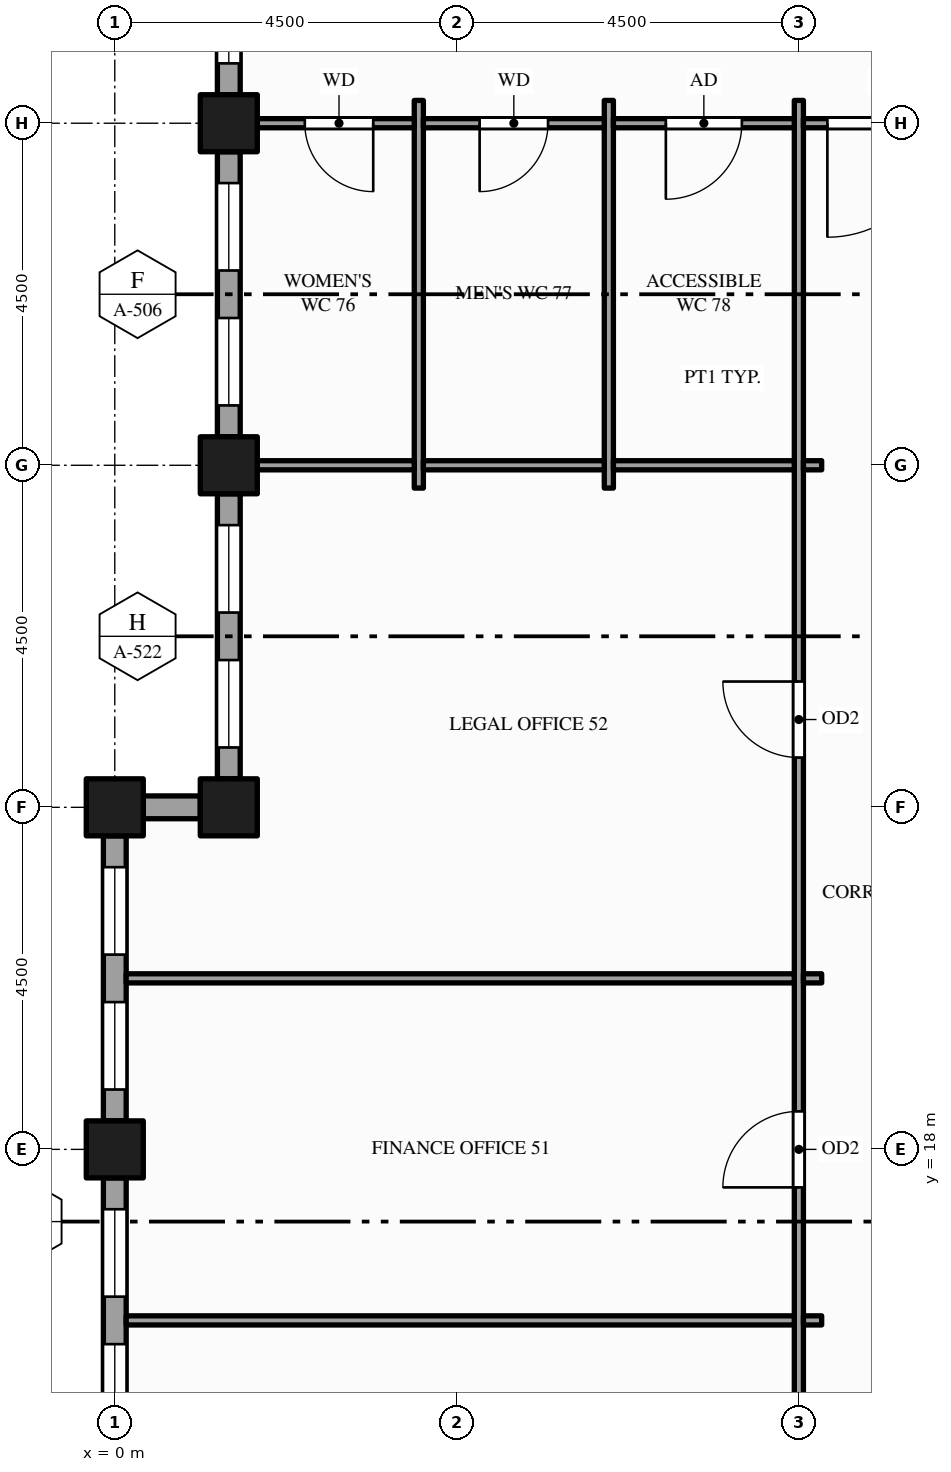
"""IFC4 building model, lengths in metres.
Left out: names, types, materials, properties, quantities, classifications, styles, units other than length and angle.
Written with IfcOpenShell. Run it as: python <this file> out.ifc"""

import sys

from ifc_helpers import new_model, si_unit, direction, frame, frame_2d, origin, origin_2d, place, context, subcontext, project, spatial, rectangle, hollow_rectangle, extrude, element, fill, save


model = new_model("IFC4")
c1 = context("Model", 3, precision=1e-05, world=origin(), true_north=direction((0.0, 1.0)))
c2 = subcontext(c1, "Body", "Model", "MODEL_VIEW")
j1 = project(units=[si_unit("LENGTHUNIT", "METRE"), si_unit("PLANEANGLEUNIT", "RADIAN")], contexts=[c1])
p1 = place(None, origin())
s1 = spatial("IfcSite", under=j1, at=p1, CompositionType="ELEMENT")
p2 = place(p1, origin())
s2 = spatial("IfcBuilding", under=s1, at=p2, CompositionType="ELEMENT")
p3 = place(p2, frame((0.0, 0.0, 199.0)))
s3 = spatial("IfcBuildingStorey", under=s2, at=p3, CompositionType="ELEMENT", Elevation=199.0)
for number, where, z_axis, x_axis in (
    (1, (0.0, 18.0, -0.15), (0.0, 0.0, 1.0), (1.0, 0.0, 0.0)),
    (2, (0.0, 22.5, -0.15), (0.0, 0.0, 1.0), (1.0, 0.0, 0.0)),
    (3, (1.5, 22.5, -0.15), (0.0, 0.0, 1.0), (1.0, 0.0, 0.0)),
    (4, (1.5, 27.0, -0.15), (0.0, 0.0, 1.0), (1.0, 0.0, 0.0)),
    (5, (1.5, 31.5, -0.15), (0.0, 0.0, 1.0), (1.0, 0.0, 0.0)),
):
    element("IfcColumn", number, at=place(p3, frame(where, z_axis=z_axis, x_axis=x_axis)), inside=s3, PredefinedType="COLUMN", context=c2, shape_type="SweptSolid", body=[
        extrude(hollow_rectangle(XDim=0.75, YDim=0.75, WallThickness=0.036, at=origin_2d()), origin(), (0.0, 0.0, 1.0), 4.0),
    ])
p4 = place(p3, frame((1.5, 36.0, 0.0), z_axis=(0.0, 0.0, 1.0), x_axis=(0.0, -1.0, 0.0)))
e6 = element("IfcWall", 6, at=p4, inside=s3, PredefinedType="STANDARD", context=c2, shape_type="SweptSolid", body=[
    extrude(rectangle(XDim=4.125, YDim=0.3, at=frame_2d((2.062, 0.0))), origin(), (0.0, 0.0, 1.0), 3.157),
])
p5 = place(p4, frame((0.4, 0.0, 0.9)))
e7 = element("IfcOpeningElement", 7, at=p5, cuts=e6, PredefinedType="OPENING", context=c2, shape_type="SweptSolid", body=[
    extrude(rectangle(XDim=1.55, YDim=2.0, at=frame_2d((0.775, 1.0))), frame((0.0, 0.16, 0.0), z_axis=(0.0, -1.0, 0.0), x_axis=(1.0, 0.0, 0.0)), (0.0, 0.0, 1.0), 0.32),
])
p6 = place(p4, frame((2.562, 0.0, 0.9)))
e8 = element("IfcOpeningElement", 8, at=p6, cuts=e6, PredefinedType="OPENING", context=c2, shape_type="SweptSolid", body=[
    extrude(rectangle(XDim=1.15, YDim=2.0, at=frame_2d((0.575, 1.0))), frame((0.0, 0.16, 0.0), z_axis=(0.0, -1.0, 0.0), x_axis=(1.0, 0.0, 0.0)), (0.0, 0.0, 1.0), 0.32),
])
p7 = place(p3, frame((1.5, 31.125, 0.0), z_axis=(0.0, 0.0, 1.0), x_axis=(0.0, -1.0, 0.0)))
e9 = element("IfcWall", 9, at=p7, inside=s3, PredefinedType="STANDARD", context=c2, shape_type="SweptSolid", body=[
    extrude(rectangle(XDim=3.75, YDim=0.3, at=frame_2d((1.875, 0.0))), origin(), (0.0, 0.0, 1.0), 3.157),
])
p8 = place(p7, frame((0.413, 0.0, 0.9)))
e10 = element("IfcOpeningElement", 10, at=p8, cuts=e9, PredefinedType="OPENING", context=c2, shape_type="SweptSolid", body=[
    extrude(rectangle(XDim=1.15, YDim=2.0, at=frame_2d((0.575, 1.0))), frame((0.0, 0.16, 0.0), z_axis=(0.0, -1.0, 0.0), x_axis=(1.0, 0.0, 0.0)), (0.0, 0.0, 1.0), 0.32),
])
p9 = place(p7, frame((2.188, 0.0, 0.9)))
e11 = element("IfcOpeningElement", 11, at=p9, cuts=e9, PredefinedType="OPENING", context=c2, shape_type="SweptSolid", body=[
    extrude(rectangle(XDim=1.15, YDim=2.0, at=frame_2d((0.575, 1.0))), frame((0.0, 0.16, 0.0), z_axis=(0.0, -1.0, 0.0), x_axis=(1.0, 0.0, 0.0)), (0.0, 0.0, 1.0), 0.32),
])
p10 = place(p3, frame((1.5, 26.625, 0.0), z_axis=(0.0, 0.0, 1.0), x_axis=(0.0, -1.0, 0.0)))
e12 = element("IfcWall", 12, at=p10, inside=s3, PredefinedType="STANDARD", context=c2, shape_type="SweptSolid", body=[
    extrude(rectangle(XDim=3.75, YDim=0.3, at=frame_2d((1.875, 0.0))), origin(), (0.0, 0.0, 1.0), 3.157),
])
p11 = place(p10, frame((0.413, 0.0, 0.9)))
e13 = element("IfcOpeningElement", 13, at=p11, cuts=e12, PredefinedType="OPENING", context=c2, shape_type="SweptSolid", body=[
    extrude(rectangle(XDim=1.15, YDim=2.0, at=frame_2d((0.575, 1.0))), frame((0.0, 0.16, 0.0), z_axis=(0.0, -1.0, 0.0), x_axis=(1.0, 0.0, 0.0)), (0.0, 0.0, 1.0), 0.32),
])
p12 = place(p10, frame((2.188, 0.0, 0.9)))
e14 = element("IfcOpeningElement", 14, at=p12, cuts=e12, PredefinedType="OPENING", context=c2, shape_type="SweptSolid", body=[
    extrude(rectangle(XDim=1.15, YDim=2.0, at=frame_2d((0.575, 1.0))), frame((0.0, 0.16, 0.0), z_axis=(0.0, -1.0, 0.0), x_axis=(1.0, 0.0, 0.0)), (0.0, 0.0, 1.0), 0.32),
])
p13 = place(p3, frame((1.125, 22.5, 0.0), z_axis=(0.0, 0.0, 1.0), x_axis=(-1.0, 0.0, 0.0)))
e15 = element("IfcWall", 15, at=p13, inside=s3, PredefinedType="STANDARD", context=c2, shape_type="SweptSolid", body=[
    extrude(rectangle(XDim=0.75, YDim=0.3, at=frame_2d((0.375, 0.0))), origin(), (0.0, 0.0, 1.0), 3.157),
])
p14 = place(p3, frame((0.0, 22.125, 0.0), z_axis=(0.0, 0.0, 1.0), x_axis=(0.0, -1.0, 0.0)))
e16 = element("IfcWall", 16, at=p14, inside=s3, PredefinedType="STANDARD", context=c2, shape_type="SweptSolid", body=[
    extrude(rectangle(XDim=3.75, YDim=0.3, at=frame_2d((1.875, 0.0))), origin(), (0.0, 0.0, 1.0), 3.157),
])
p15 = place(p14, frame((0.413, 0.0, 0.9)))
e17 = element("IfcOpeningElement", 17, at=p15, cuts=e16, PredefinedType="OPENING", context=c2, shape_type="SweptSolid", body=[
    extrude(rectangle(XDim=1.15, YDim=2.0, at=frame_2d((0.575, 1.0))), frame((0.0, 0.16, 0.0), z_axis=(0.0, -1.0, 0.0), x_axis=(1.0, 0.0, 0.0)), (0.0, 0.0, 1.0), 0.32),
])
p16 = place(p14, frame((2.188, 0.0, 0.9)))
e18 = element("IfcOpeningElement", 18, at=p16, cuts=e16, PredefinedType="OPENING", context=c2, shape_type="SweptSolid", body=[
    extrude(rectangle(XDim=1.15, YDim=2.0, at=frame_2d((0.575, 1.0))), frame((0.0, 0.16, 0.0), z_axis=(0.0, -1.0, 0.0), x_axis=(1.0, 0.0, 0.0)), (0.0, 0.0, 1.0), 0.32),
])
p17 = place(p3, frame((0.0, 17.625, 0.0), z_axis=(0.0, 0.0, 1.0), x_axis=(0.0, -1.0, 0.0)))
e19 = element("IfcWall", 19, at=p17, inside=s3, PredefinedType="STANDARD", context=c2, shape_type="SweptSolid", body=[
    extrude(rectangle(XDim=3.75, YDim=0.3, at=frame_2d((1.875, 0.0))), origin(), (0.0, 0.0, 1.0), 3.157),
])
p18 = place(p17, frame((0.413, 0.0, 0.9)))
e20 = element("IfcOpeningElement", 20, at=p18, cuts=e19, PredefinedType="OPENING", context=c2, shape_type="SweptSolid", body=[
    extrude(rectangle(XDim=1.15, YDim=2.0, at=frame_2d((0.575, 1.0))), frame((0.0, 0.16, 0.0), z_axis=(0.0, -1.0, 0.0), x_axis=(1.0, 0.0, 0.0)), (0.0, 0.0, 1.0), 0.32),
])
p19 = place(p17, frame((2.188, 0.0, 0.9)))
e21 = element("IfcOpeningElement", 21, at=p19, cuts=e19, PredefinedType="OPENING", context=c2, shape_type="SweptSolid", body=[
    extrude(rectangle(XDim=1.15, YDim=2.0, at=frame_2d((0.575, 1.0))), frame((0.0, 0.16, 0.0), z_axis=(0.0, -1.0, 0.0), x_axis=(1.0, 0.0, 0.0)), (0.0, 0.0, 1.0), 0.32),
])
for number, where, z_axis, x_axis in (
    (22, (4.0, 26.7, 0.0), (0.0, 0.0, 1.0), (0.0, 1.0, 0.0)),
    (23, (6.5, 26.7, 0.0), (0.0, 0.0, 1.0), (0.0, 1.0, 0.0)),
):
    element("IfcWall", number, at=place(p3, frame(where, z_axis=z_axis, x_axis=x_axis)), inside=s3, PredefinedType="PARTITIONING", context=c2, shape_type="SweptSolid", body=[
        extrude(rectangle(XDim=5.1, YDim=0.12, at=frame_2d((2.55, 0.0))), origin(), (0.0, 0.0, 1.0), 3.85),
    ])
p20 = place(p3, frame((9.0, 10.95, 0.0), z_axis=(0.0, 0.0, 1.0), x_axis=(0.0, 1.0, 0.0)))
e24 = element("IfcWall", 24, at=p20, inside=s3, PredefinedType="PARTITIONING", context=c2, shape_type="SweptSolid", body=[
    extrude(rectangle(XDim=20.85, YDim=0.12, at=frame_2d((10.425, 0.0))), origin(), (0.0, 0.0, 1.0), 2.6),
])
p21 = place(p20, frame((2.05, 0.0, 0.0)))
e25 = element("IfcOpeningElement", 25, at=p21, cuts=e24, PredefinedType="OPENING", context=c2, shape_type="SweptSolid", body=[
    extrude(rectangle(XDim=1.0, YDim=2.1, at=frame_2d((0.5, 1.05))), frame((0.0, 0.07, 0.0), z_axis=(0.0, -1.0, 0.0), x_axis=(1.0, 0.0, 0.0)), (0.0, 0.0, 1.0), 0.14),
])
p22 = place(p20, frame((6.55, 0.0, 0.0)))
e26 = element("IfcOpeningElement", 26, at=p22, cuts=e24, PredefinedType="OPENING", context=c2, shape_type="SweptSolid", body=[
    extrude(rectangle(XDim=1.0, YDim=2.1, at=frame_2d((0.5, 1.05))), frame((0.0, 0.07, 0.0), z_axis=(0.0, -1.0, 0.0), x_axis=(1.0, 0.0, 0.0)), (0.0, 0.0, 1.0), 0.14),
])
p23 = place(p20, frame((12.205, 0.0, 0.0)))
e27 = element("IfcOpeningElement", 27, at=p23, cuts=e24, PredefinedType="OPENING", context=c2, shape_type="SweptSolid", body=[
    extrude(rectangle(XDim=1.0, YDim=2.1, at=frame_2d((0.5, 1.05))), frame((0.0, 0.07, 0.0), z_axis=(0.0, -1.0, 0.0), x_axis=(1.0, 0.0, 0.0)), (0.0, 0.0, 1.0), 0.14),
])
p24 = place(p3, frame((0.15, 15.75, 0.0), z_axis=(0.0, 0.0, 1.0), x_axis=(1.0, 0.0, 0.0)))
e28 = element("IfcWall", 28, at=p24, inside=s3, PredefinedType="PARTITIONING", context=c2, shape_type="SweptSolid", body=[
    extrude(rectangle(XDim=8.79, YDim=0.12, at=frame_2d((4.395, 0.0))), origin(), (0.0, 0.0, 1.0), 2.87),
])
p25 = place(p3, frame((9.06, 15.75, 0.0), z_axis=(0.0, 0.0, 1.0), x_axis=(1.0, 0.0, 0.0)))
e29 = element("IfcWall", 29, at=p25, inside=s3, PredefinedType="PARTITIONING", context=c2, shape_type="SweptSolid", body=[
    extrude(rectangle(XDim=0.24, YDim=0.12, at=frame_2d((0.12, 0.0))), origin(), (0.0, 0.0, 1.0), 2.87),
])
p26 = place(p3, frame((0.15, 20.25, 0.0), z_axis=(0.0, 0.0, 1.0), x_axis=(1.0, 0.0, 0.0)))
e30 = element("IfcWall", 30, at=p26, inside=s3, PredefinedType="PARTITIONING", context=c2, shape_type="SweptSolid", body=[
    extrude(rectangle(XDim=8.79, YDim=0.12, at=frame_2d((4.395, 0.0))), origin(), (0.0, 0.0, 1.0), 2.87),
])
p27 = place(p3, frame((9.06, 20.25, 0.0), z_axis=(0.0, 0.0, 1.0), x_axis=(1.0, 0.0, 0.0)))
e31 = element("IfcWall", 31, at=p27, inside=s3, PredefinedType="PARTITIONING", context=c2, shape_type="SweptSolid", body=[
    extrude(rectangle(XDim=0.24, YDim=0.12, at=frame_2d((0.12, 0.0))), origin(), (0.0, 0.0, 1.0), 2.87),
])
p28 = place(p3, frame((1.65, 27.0, 0.0), z_axis=(0.0, 0.0, 1.0), x_axis=(1.0, 0.0, 0.0)))
e32 = element("IfcWall", 32, at=p28, inside=s3, PredefinedType="PARTITIONING", context=c2, shape_type="SweptSolid", body=[
    extrude(rectangle(XDim=2.29, YDim=0.12, at=frame_2d((1.145, 0.0))), origin(), (0.0, 0.0, 1.0), 2.87),
])
for number, where, z_axis, x_axis in (
    (33, (4.06, 27.0, 0.0), (0.0, 0.0, 1.0), (1.0, 0.0, 0.0)),
    (34, (6.56, 27.0, 0.0), (0.0, 0.0, 1.0), (1.0, 0.0, 0.0)),
):
    element("IfcWall", number, at=place(p3, frame(where, z_axis=z_axis, x_axis=x_axis)), inside=s3, PredefinedType="PARTITIONING", context=c2, shape_type="SweptSolid", body=[
        extrude(rectangle(XDim=2.38, YDim=0.12, at=frame_2d((1.19, 0.0))), origin(), (0.0, 0.0, 1.0), 2.87),
    ])
p29 = place(p3, frame((9.06, 27.0, 0.0), z_axis=(0.0, 0.0, 1.0), x_axis=(1.0, 0.0, 0.0)))
e35 = element("IfcWall", 35, at=p29, inside=s3, PredefinedType="PARTITIONING", context=c2, shape_type="SweptSolid", body=[
    extrude(rectangle(XDim=0.24, YDim=0.12, at=frame_2d((0.12, 0.0))), origin(), (0.0, 0.0, 1.0), 2.87),
])
p30 = place(p3, frame((1.65, 31.5, 0.0), z_axis=(0.0, 0.0, 1.0), x_axis=(1.0, 0.0, 0.0)))
e36 = element("IfcWall", 36, at=p30, inside=s3, PredefinedType="PARTITIONING", context=c2, shape_type="SweptSolid", body=[
    extrude(rectangle(XDim=2.29, YDim=0.12, at=frame_2d((1.145, 0.0))), origin(), (0.0, 0.0, 1.0), 2.87),
])
p31 = place(p30, frame((0.85, 0.0, 0.0)))
e37 = element("IfcOpeningElement", 37, at=p31, cuts=e36, PredefinedType="OPENING", context=c2, shape_type="SweptSolid", body=[
    extrude(rectangle(XDim=0.9, YDim=2.1, at=frame_2d((0.45, 1.05))), frame((0.0, 0.07, 0.0), z_axis=(0.0, -1.0, 0.0), x_axis=(1.0, 0.0, 0.0)), (0.0, 0.0, 1.0), 0.14),
])
p32 = place(p3, frame((4.06, 31.5, 0.0), z_axis=(0.0, 0.0, 1.0), x_axis=(1.0, 0.0, 0.0)))
e38 = element("IfcWall", 38, at=p32, inside=s3, PredefinedType="PARTITIONING", context=c2, shape_type="SweptSolid", body=[
    extrude(rectangle(XDim=2.38, YDim=0.12, at=frame_2d((1.19, 0.0))), origin(), (0.0, 0.0, 1.0), 2.87),
])
p33 = place(p32, frame((0.74, 0.0, 0.0)))
e39 = element("IfcOpeningElement", 39, at=p33, cuts=e38, PredefinedType="OPENING", context=c2, shape_type="SweptSolid", body=[
    extrude(rectangle(XDim=0.9, YDim=2.1, at=frame_2d((0.45, 1.05))), frame((0.0, 0.07, 0.0), z_axis=(0.0, -1.0, 0.0), x_axis=(1.0, 0.0, 0.0)), (0.0, 0.0, 1.0), 0.14),
])
p34 = place(p3, frame((6.56, 31.5, 0.0), z_axis=(0.0, 0.0, 1.0), x_axis=(1.0, 0.0, 0.0)))
e40 = element("IfcWall", 40, at=p34, inside=s3, PredefinedType="PARTITIONING", context=c2, shape_type="SweptSolid", body=[
    extrude(rectangle(XDim=2.38, YDim=0.12, at=frame_2d((1.19, 0.0))), origin(), (0.0, 0.0, 1.0), 2.87),
])
p35 = place(p34, frame((0.69, 0.0, 0.0)))
e41 = element("IfcOpeningElement", 41, at=p35, cuts=e40, PredefinedType="OPENING", context=c2, shape_type="SweptSolid", body=[
    extrude(rectangle(XDim=1.0, YDim=2.1, at=frame_2d((0.5, 1.05))), frame((0.0, 0.07, 0.0), z_axis=(0.0, -1.0, 0.0), x_axis=(1.0, 0.0, 0.0)), (0.0, 0.0, 1.0), 0.14),
])
p36 = place(p3, frame((9.06, 31.5, 0.0), z_axis=(0.0, 0.0, 1.0), x_axis=(1.0, 0.0, 0.0)))
e42 = element("IfcWall", 42, at=p36, inside=s3, PredefinedType="PARTITIONING", context=c2, shape_type="SweptSolid", body=[
    extrude(rectangle(XDim=2.13, YDim=0.12, at=frame_2d((1.065, 0.0))), origin(), (0.0, 0.0, 1.0), 2.87),
])
p37 = place(p36, frame((0.315, 0.0, 0.0)))
e43 = element("IfcOpeningElement", 43, at=p37, cuts=e42, PredefinedType="OPENING", context=c2, shape_type="SweptSolid", body=[
    extrude(rectangle(XDim=1.5, YDim=2.1, at=frame_2d((0.75, 1.05))), frame((0.0, 0.07, 0.0), z_axis=(0.0, -1.0, 0.0), x_axis=(1.0, 0.0, 0.0)), (0.0, 0.0, 1.0), 0.14),
])
p38 = place(p6, origin())
e44 = element("IfcWindow", 44, at=p38, inside=s3, PartitioningType="SINGLE_PANEL", PredefinedType="WINDOW", context=c2, shape_type="SweptSolid", body=[
    extrude(rectangle(XDim=1.15, YDim=2.0, at=frame_2d((0.575, 1.0))), frame((0.0, 0.03, 0.0), z_axis=(0.0, -1.0, 0.0), x_axis=(1.0, 0.0, 0.0)), (0.0, 0.0, 1.0), 0.06),
])
fill(e8, e44)
p39 = place(p8, origin())
e45 = element("IfcWindow", 45, at=p39, inside=s3, PartitioningType="SINGLE_PANEL", PredefinedType="WINDOW", context=c2, shape_type="SweptSolid", body=[
    extrude(rectangle(XDim=1.15, YDim=2.0, at=frame_2d((0.575, 1.0))), frame((0.0, 0.03, 0.0), z_axis=(0.0, -1.0, 0.0), x_axis=(1.0, 0.0, 0.0)), (0.0, 0.0, 1.0), 0.06),
])
fill(e10, e45)
p40 = place(p9, origin())
e46 = element("IfcWindow", 46, at=p40, inside=s3, PartitioningType="SINGLE_PANEL", PredefinedType="WINDOW", context=c2, shape_type="SweptSolid", body=[
    extrude(rectangle(XDim=1.15, YDim=2.0, at=frame_2d((0.575, 1.0))), frame((0.0, 0.03, 0.0), z_axis=(0.0, -1.0, 0.0), x_axis=(1.0, 0.0, 0.0)), (0.0, 0.0, 1.0), 0.06),
])
fill(e11, e46)
p41 = place(p11, origin())
e47 = element("IfcWindow", 47, at=p41, inside=s3, PartitioningType="SINGLE_PANEL", PredefinedType="WINDOW", context=c2, shape_type="SweptSolid", body=[
    extrude(rectangle(XDim=1.15, YDim=2.0, at=frame_2d((0.575, 1.0))), frame((0.0, 0.03, 0.0), z_axis=(0.0, -1.0, 0.0), x_axis=(1.0, 0.0, 0.0)), (0.0, 0.0, 1.0), 0.06),
])
fill(e13, e47)
p42 = place(p12, origin())
e48 = element("IfcWindow", 48, at=p42, inside=s3, PartitioningType="SINGLE_PANEL", PredefinedType="WINDOW", context=c2, shape_type="SweptSolid", body=[
    extrude(rectangle(XDim=1.15, YDim=2.0, at=frame_2d((0.575, 1.0))), frame((0.0, 0.03, 0.0), z_axis=(0.0, -1.0, 0.0), x_axis=(1.0, 0.0, 0.0)), (0.0, 0.0, 1.0), 0.06),
])
fill(e14, e48)
p43 = place(p15, origin())
e49 = element("IfcWindow", 49, at=p43, inside=s3, PartitioningType="SINGLE_PANEL", PredefinedType="WINDOW", context=c2, shape_type="SweptSolid", body=[
    extrude(rectangle(XDim=1.15, YDim=2.0, at=frame_2d((0.575, 1.0))), frame((0.0, 0.03, 0.0), z_axis=(0.0, -1.0, 0.0), x_axis=(1.0, 0.0, 0.0)), (0.0, 0.0, 1.0), 0.06),
])
fill(e17, e49)
p44 = place(p16, origin())
e50 = element("IfcWindow", 50, at=p44, inside=s3, PartitioningType="SINGLE_PANEL", PredefinedType="WINDOW", context=c2, shape_type="SweptSolid", body=[
    extrude(rectangle(XDim=1.15, YDim=2.0, at=frame_2d((0.575, 1.0))), frame((0.0, 0.03, 0.0), z_axis=(0.0, -1.0, 0.0), x_axis=(1.0, 0.0, 0.0)), (0.0, 0.0, 1.0), 0.06),
])
fill(e18, e50)
p45 = place(p18, origin())
e51 = element("IfcWindow", 51, at=p45, inside=s3, PartitioningType="SINGLE_PANEL", PredefinedType="WINDOW", context=c2, shape_type="SweptSolid", body=[
    extrude(rectangle(XDim=1.15, YDim=2.0, at=frame_2d((0.575, 1.0))), frame((0.0, 0.03, 0.0), z_axis=(0.0, -1.0, 0.0), x_axis=(1.0, 0.0, 0.0)), (0.0, 0.0, 1.0), 0.06),
])
fill(e20, e51)
p46 = place(p19, origin())
e52 = element("IfcWindow", 52, at=p46, inside=s3, PartitioningType="SINGLE_PANEL", PredefinedType="WINDOW", context=c2, shape_type="SweptSolid", body=[
    extrude(rectangle(XDim=1.15, YDim=2.0, at=frame_2d((0.575, 1.0))), frame((0.0, 0.03, 0.0), z_axis=(0.0, -1.0, 0.0), x_axis=(1.0, 0.0, 0.0)), (0.0, 0.0, 1.0), 0.06),
])
fill(e21, e52)
p47 = place(p37, origin())
e53 = element("IfcDoor", 53, at=p47, inside=s3, OperationType="SINGLE_SWING_LEFT", PredefinedType="DOOR", context=c2, shape_type="SweptSolid", body=[
    extrude(rectangle(XDim=1.5, YDim=2.1, at=frame_2d((0.75, 1.05))), frame((0.0, 0.025, 0.0), z_axis=(0.0, -1.0, 0.0), x_axis=(1.0, 0.0, 0.0)), (0.0, 0.0, 1.0), 0.05),
])
fill(e43, e53)
p48 = place(p22, origin())
e54 = element("IfcDoor", 54, at=p48, inside=s3, OperationType="SINGLE_SWING_LEFT", PredefinedType="DOOR", context=c2, shape_type="SweptSolid", body=[
    extrude(rectangle(XDim=1.0, YDim=2.1, at=frame_2d((0.5, 1.05))), frame((0.0, 0.025, 0.0), z_axis=(0.0, -1.0, 0.0), x_axis=(1.0, 0.0, 0.0)), (0.0, 0.0, 1.0), 0.05),
])
fill(e26, e54)
p49 = place(p23, origin())
e55 = element("IfcDoor", 55, at=p49, inside=s3, OperationType="SINGLE_SWING_RIGHT", PredefinedType="DOOR", context=c2, shape_type="SweptSolid", body=[
    extrude(rectangle(XDim=1.0, YDim=2.1, at=frame_2d((0.5, 1.05))), frame((0.0, 0.025, 0.0), z_axis=(0.0, -1.0, 0.0), x_axis=(1.0, 0.0, 0.0)), (0.0, 0.0, 1.0), 0.05),
])
fill(e27, e55)
p50 = place(p31, origin())
e56 = element("IfcDoor", 56, at=p50, inside=s3, OperationType="SINGLE_SWING_RIGHT", PredefinedType="DOOR", context=c2, shape_type="SweptSolid", body=[
    extrude(rectangle(XDim=0.9, YDim=2.1, at=frame_2d((0.45, 1.05))), frame((0.0, 0.025, 0.0), z_axis=(0.0, -1.0, 0.0), x_axis=(1.0, 0.0, 0.0)), (0.0, 0.0, 1.0), 0.05),
])
fill(e37, e56)
p51 = place(p33, origin())
e57 = element("IfcDoor", 57, at=p51, inside=s3, OperationType="SINGLE_SWING_LEFT", PredefinedType="DOOR", context=c2, shape_type="SweptSolid", body=[
    extrude(rectangle(XDim=0.9, YDim=2.1, at=frame_2d((0.45, 1.05))), frame((0.0, 0.025, 0.0), z_axis=(0.0, -1.0, 0.0), x_axis=(1.0, 0.0, 0.0)), (0.0, 0.0, 1.0), 0.05),
])
fill(e39, e57)
p52 = place(p35, origin())
e58 = element("IfcDoor", 58, at=p52, inside=s3, OperationType="SINGLE_SWING_LEFT", PredefinedType="DOOR", context=c2, shape_type="SweptSolid", body=[
    extrude(rectangle(XDim=1.0, YDim=2.1, at=frame_2d((0.5, 1.05))), frame((0.0, 0.025, 0.0), z_axis=(0.0, -1.0, 0.0), x_axis=(1.0, 0.0, 0.0)), (0.0, 0.0, 1.0), 0.05),
])
fill(e41, e58)
save(model, sys.argv[1])
